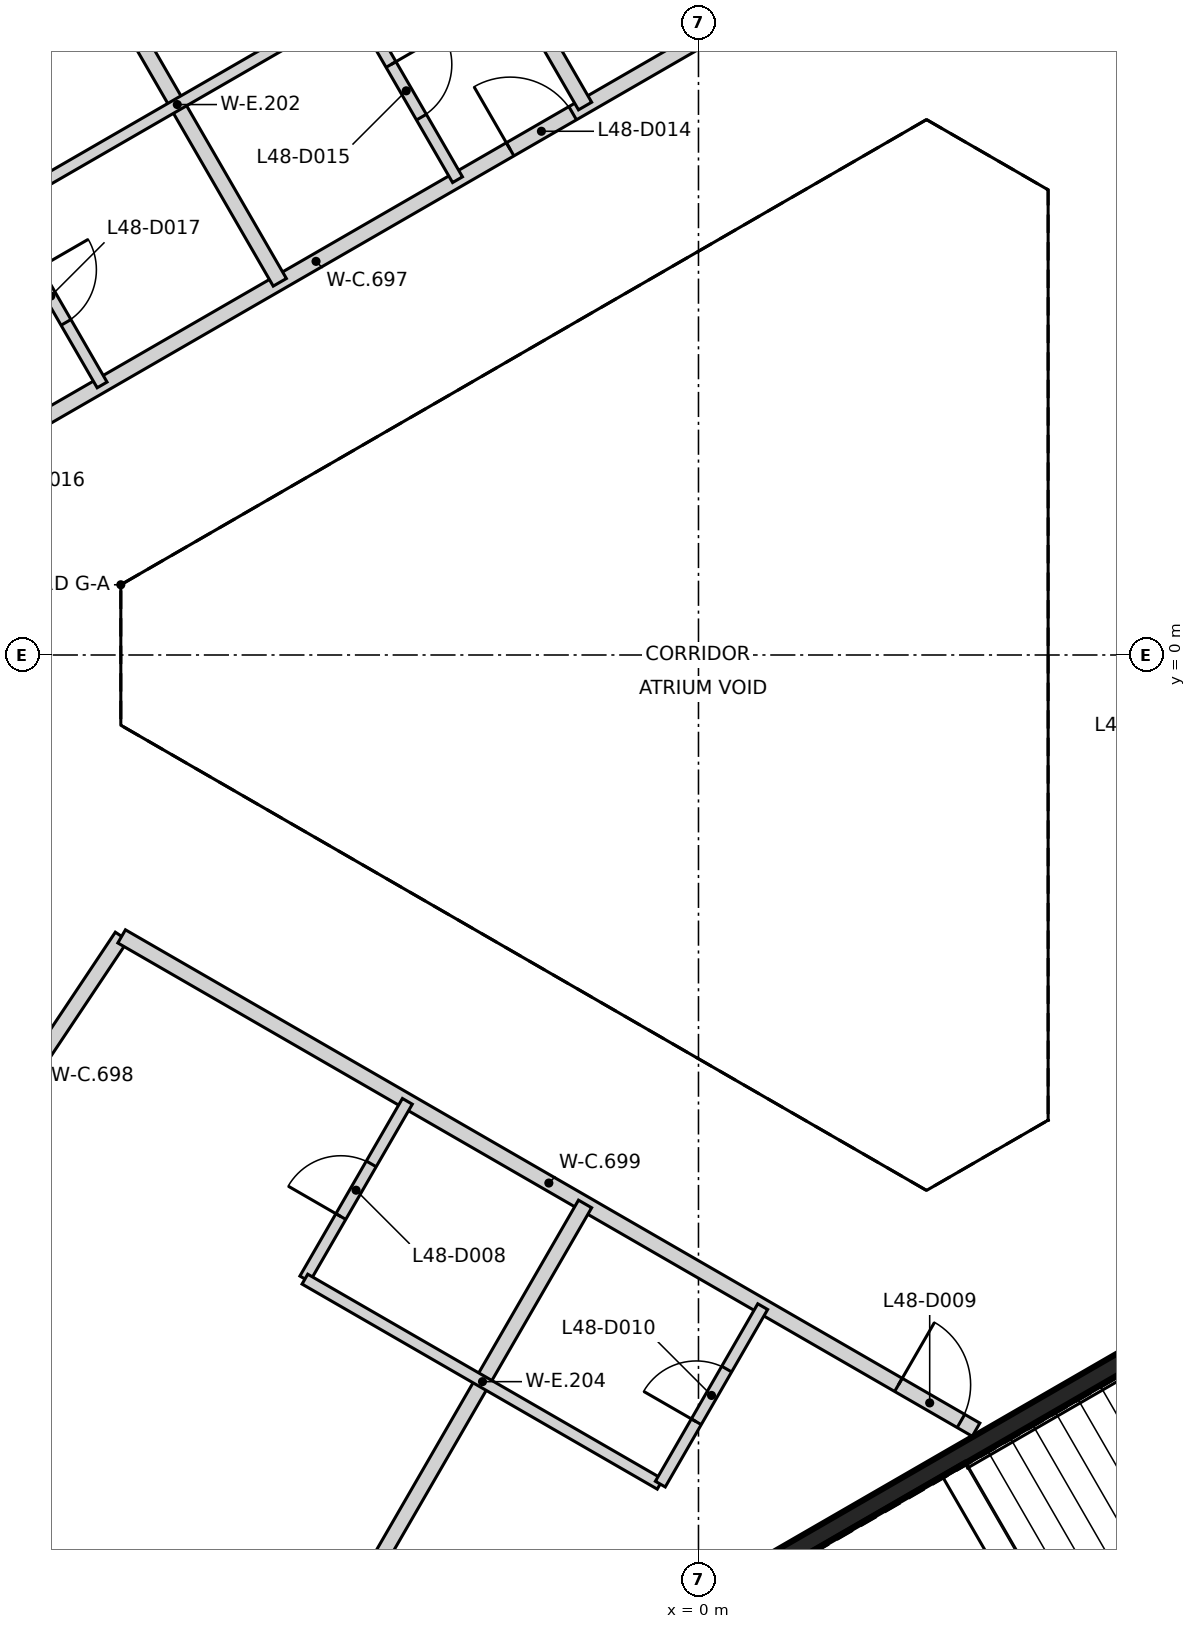
"""IFC4 building model, lengths in metres.
Left out: names, types, materials, properties, quantities, classifications, styles, units other than length and angle.
Written with IfcOpenShell. Run it as: python <this file> out.ifc"""

import sys

from ifc_helpers import new_model, si_unit, direction, frame, frame_2d, origin, place, context, subcontext, project, spatial, rectangle, extrude, element, fill, save


model = new_model("IFC4")
c1 = context("Model", 3, precision=1e-05, world=origin(), true_north=direction((0.0, 1.0)))
c2 = subcontext(c1, "Body", "Model", "MODEL_VIEW")
j1 = project(units=[si_unit("LENGTHUNIT", "METRE"), si_unit("PLANEANGLEUNIT", "RADIAN")], contexts=[c1])
p1 = place(None, origin())
s1 = spatial("IfcSite", under=j1, at=p1, CompositionType="ELEMENT")
p2 = place(p1, origin())
s2 = spatial("IfcBuilding", under=s1, at=p2, CompositionType="ELEMENT")
p3 = place(p2, frame((0.0, 0.0, 193.6)))
s3 = spatial("IfcBuildingStorey", under=s2, at=p3, CompositionType="ELEMENT", Elevation=193.6)
p4 = place(p3, frame((10.42, 6.498, 0.0), z_axis=(0.0, 0.0, 1.0), x_axis=(-0.866021906294, 0.500006057782, 0.0)))
e1 = element("IfcWall", 1, at=p4, inside=s3, PredefinedType="SHEAR", context=c2, shape_type="SweptSolid", body=[
    extrude(rectangle(XDim=11.55, YDim=0.25, at=frame_2d((5.775, 0.0))), origin(), (0.0, 0.0, 1.0), 3.25),
])
p5 = place(p4, frame((10.025, 0.0, 0.0)))
e2 = element("IfcOpeningElement", 2, at=p5, cuts=e1, PredefinedType="OPENING", context=c2, shape_type="SweptSolid", body=[
    extrude(rectangle(XDim=1.2, YDim=2.1, at=frame_2d((0.6, 1.05))), frame((0.0, 0.135, 0.0), z_axis=(0.0, -1.0, 0.0), x_axis=(1.0, 0.0, 0.0)), (0.0, 0.0, 1.0), 0.27),
])
p6 = place(p4, frame((8.725, 0.0, 0.0)))
e3 = element("IfcOpeningElement", 3, at=p6, cuts=e1, PredefinedType="OPENING", context=c2, shape_type="SweptSolid", body=[
    extrude(rectangle(XDim=1.2, YDim=2.1, at=frame_2d((0.6, 1.05))), frame((0.0, 0.135, 0.0), z_axis=(0.0, -1.0, 0.0), x_axis=(1.0, 0.0, 0.0)), (0.0, 0.0, 1.0), 0.27),
])
p7 = place(p3, frame((0.417, -12.273, 0.0), z_axis=(0.0, 0.0, 1.0), x_axis=(0.866021906294, 0.500006057782, 0.0)))
e4 = element("IfcWall", 4, at=p7, inside=s3, PredefinedType="SHEAR", context=c2, shape_type="SweptSolid", body=[
    extrude(rectangle(XDim=11.55, YDim=0.25, at=frame_2d((5.775, 0.0))), origin(), (0.0, 0.0, 1.0), 3.25),
])
p8 = place(p7, frame((10.025, 0.0, 0.0)))
e5 = element("IfcOpeningElement", 5, at=p8, cuts=e4, PredefinedType="OPENING", context=c2, shape_type="SweptSolid", body=[
    extrude(rectangle(XDim=1.2, YDim=2.1, at=frame_2d((0.6, 1.05))), frame((0.0, 0.135, 0.0), z_axis=(0.0, -1.0, 0.0), x_axis=(1.0, 0.0, 0.0)), (0.0, 0.0, 1.0), 0.27),
])
p9 = place(p7, frame((8.725, 0.0, 0.0)))
e6 = element("IfcOpeningElement", 6, at=p9, cuts=e4, PredefinedType="OPENING", context=c2, shape_type="SweptSolid", body=[
    extrude(rectangle(XDim=1.2, YDim=2.1, at=frame_2d((0.6, 1.05))), frame((0.0, 0.135, 0.0), z_axis=(0.0, -1.0, 0.0), x_axis=(1.0, 0.0, 0.0)), (0.0, 0.0, 1.0), 0.27),
])
p10 = place(p3, frame((-10.652, 1.934, 0.0), z_axis=(0.0, 0.0, 1.0), x_axis=(0.866066882415, 0.499928150021, 0.0)))
e7 = element("IfcWall", 7, at=p10, inside=s3, PredefinedType="PARTITIONING", context=c2, shape_type="SweptSolid", body=[
    extrude(rectangle(XDim=12.98, YDim=0.2, at=frame_2d((6.49, 0.0))), origin(), (0.0, 0.0, 1.0), 3.25),
])
p11 = place(p10, frame((9.439, 0.0, 0.0)))
e8 = element("IfcOpeningElement", 8, at=p11, cuts=e7, PredefinedType="OPENING", context=c2, shape_type="SweptSolid", body=[
    extrude(rectangle(XDim=0.95, YDim=2.1, at=frame_2d((0.475, 1.05))), frame((0.0, 0.11, 0.0), z_axis=(0.0, -1.0, 0.0), x_axis=(1.0, 0.0, 0.0)), (0.0, 0.0, 1.0), 0.22),
])
p12 = place(p10, frame((0.229, 0.0, 0.0)))
e9 = element("IfcOpeningElement", 9, at=p12, cuts=e7, PredefinedType="OPENING", context=c2, shape_type="SweptSolid", body=[
    extrude(rectangle(XDim=0.95, YDim=2.1, at=frame_2d((0.475, 1.05))), frame((0.0, 0.11, 0.0), z_axis=(0.0, -1.0, 0.0), x_axis=(1.0, 0.0, 0.0)), (0.0, 0.0, 1.0), 0.22),
])
p13 = place(p3, frame((-9.697, -6.864, 0.0), z_axis=(0.0, 0.0, 1.0), x_axis=(0.554670545446, 0.832070060761, 0.0)))
e10 = element("IfcWall", 10, at=p13, inside=s3, PredefinedType="PARTITIONING", context=c2, shape_type="SweptSolid", body=[
    extrude(rectangle(XDim=3.8, YDim=0.2, at=frame_2d((1.9, 0.0))), origin(), (0.0, 0.0, 1.0), 3.25),
])
p14 = place(p3, frame((-7.589, -3.702, 0.0), z_axis=(0.0, 0.0, 1.0), x_axis=(0.86602490244, -0.500000868353, 0.0)))
e11 = element("IfcWall", 11, at=p14, inside=s3, PredefinedType="PARTITIONING", context=c2, shape_type="SweptSolid", body=[
    extrude(rectangle(XDim=12.98, YDim=0.2, at=frame_2d((6.49, 0.0))), origin(), (0.0, 0.0, 1.0), 3.25),
])
p15 = place(p14, frame((11.8, 0.0, 0.0)))
e12 = element("IfcOpeningElement", 12, at=p15, cuts=e11, PredefinedType="OPENING", context=c2, shape_type="SweptSolid", body=[
    extrude(rectangle(XDim=0.95, YDim=2.1, at=frame_2d((0.475, 1.05))), frame((0.0, 0.11, 0.0), z_axis=(0.0, -1.0, 0.0), x_axis=(1.0, 0.0, 0.0)), (0.0, 0.0, 1.0), 0.22),
])
p16 = place(p3, frame((-12.067, 16.263, 0.0), z_axis=(0.0, 0.0, 1.0), x_axis=(0.500016190239, -0.866016056144, 0.0)))
e13 = element("IfcWall", 13, at=p16, inside=s3, PredefinedType="PARTITIONING", context=c2, shape_type="SweptSolid", body=[
    extrude(rectangle(XDim=13.118, YDim=0.2, at=frame_2d((6.559, 0.0))), origin(), (0.0, 0.0, 1.0), 3.25),
])
for number, where, z_axis, x_axis in (
    (14, (-8.052, 18.582, 0.0), (0.0, 0.0, 1.0), (0.5, -0.866, 0.0)),
    (15, (-8.051, -18.582, 0.0), (0.0, 0.0, 1.0), (0.5, 0.866, 0.0)),
):
    element("IfcWall", number, at=place(p3, frame(where, z_axis=z_axis, x_axis=x_axis)), inside=s3, PredefinedType="PARTITIONING", context=c2, shape_type="SweptSolid", body=[
        extrude(rectangle(XDim=13.118, YDim=0.2, at=frame_2d((6.559, 0.0))), origin(), (0.0, 0.0, 1.0), 3.25),
    ])
p17 = place(p3, frame((-9.195, 5.889, 0.0), z_axis=(0.0, 0.0, 1.0), x_axis=(0.500129820725, -0.865950438779, 0.0)))
e16 = element("IfcWall", 16, at=p17, inside=s3, PredefinedType="PARTITIONING", context=c2, shape_type="SweptSolid", body=[
    extrude(rectangle(XDim=2.698, YDim=0.15, at=frame_2d((1.349, 0.0))), origin(), (0.0, 0.0, 1.0), 3.25),
])
p18 = place(p17, frame((0.948, 0.0, 0.0)))
e17 = element("IfcOpeningElement", 17, at=p18, cuts=e16, PredefinedType="OPENING", context=c2, shape_type="SweptSolid", body=[
    extrude(rectangle(XDim=0.8, YDim=2.1, at=frame_2d((0.4, 1.05))), frame((0.0, 0.085, 0.0), z_axis=(0.0, -1.0, 0.0), x_axis=(1.0, 0.0, 0.0)), (0.0, 0.0, 1.0), 0.17),
])
p19 = place(p3, frame((-9.194, 5.892, 0.0), z_axis=(0.0, 0.0, 1.0), x_axis=(0.8659934935, 0.500055266161, 0.0)))
e18 = element("IfcWall", 18, at=p19, inside=s3, PredefinedType="PARTITIONING", context=c2, shape_type="SweptSolid", body=[
    extrude(rectangle(XDim=5.397, YDim=0.15, at=frame_2d((2.699, 0.0))), origin(), (0.0, 0.0, 1.0), 3.25),
])
p20 = place(p3, frame((-5.179, -8.208, 0.0), z_axis=(0.0, 0.0, 1.0), x_axis=(0.500061949227, 0.865989634427, 0.0)))
e19 = element("IfcWall", 19, at=p20, inside=s3, PredefinedType="PARTITIONING", context=c2, shape_type="SweptSolid", body=[
    extrude(rectangle(XDim=2.698, YDim=0.15, at=frame_2d((1.349, 0.0))), origin(), (0.0, 0.0, 1.0), 3.25),
])
p21 = place(p20, frame((0.948, 0.0, 0.0)))
e20 = element("IfcOpeningElement", 20, at=p21, cuts=e19, PredefinedType="OPENING", context=c2, shape_type="SweptSolid", body=[
    extrude(rectangle(XDim=0.8, YDim=2.1, at=frame_2d((0.4, 1.05))), frame((0.0, 0.085, 0.0), z_axis=(0.0, -1.0, 0.0), x_axis=(1.0, 0.0, 0.0)), (0.0, 0.0, 1.0), 0.17),
])
p22 = place(p3, frame((-5.178, -8.211, 0.0), z_axis=(0.0, 0.0, 1.0), x_axis=(0.866046199912, -0.49996397832, 0.0)))
e21 = element("IfcWall", 21, at=p22, inside=s3, PredefinedType="PARTITIONING", context=c2, shape_type="SweptSolid", body=[
    extrude(rectangle(XDim=5.396, YDim=0.15, at=frame_2d((2.698, 0.0))), origin(), (0.0, 0.0, 1.0), 3.25),
])
p23 = place(p3, frame((-4.52, 8.591, 0.0), z_axis=(0.0, 0.0, 1.0), x_axis=(0.500048589285, -0.86599734893, 0.0)))
e22 = element("IfcWall", 22, at=p23, inside=s3, PredefinedType="PARTITIONING", context=c2, shape_type="SweptSolid", body=[
    extrude(rectangle(XDim=2.7, YDim=0.15, at=frame_2d((1.35, 0.0))), origin(), (0.0, 0.0, 1.0), 3.25),
])
p24 = place(p23, frame((0.95, 0.0, 0.0)))
e23 = element("IfcOpeningElement", 23, at=p24, cuts=e22, PredefinedType="OPENING", context=c2, shape_type="SweptSolid", body=[
    extrude(rectangle(XDim=0.8, YDim=2.1, at=frame_2d((0.4, 1.05))), frame((0.0, 0.085, 0.0), z_axis=(0.0, -1.0, 0.0), x_axis=(1.0, 0.0, 0.0)), (0.0, 0.0, 1.0), 0.17),
])
p25 = place(p3, frame((-0.502, -10.908, 0.0), z_axis=(0.0, 0.0, 1.0), x_axis=(0.499675408556, 0.866212725654, 0.0)))
e24 = element("IfcWall", 24, at=p25, inside=s3, PredefinedType="PARTITIONING", context=c2, shape_type="SweptSolid", body=[
    extrude(rectangle(XDim=2.696, YDim=0.15, at=frame_2d((1.348, 0.0))), origin(), (0.0, 0.0, 1.0), 3.25),
])
p26 = place(p25, frame((0.948, 0.0, 0.0)))
e25 = element("IfcOpeningElement", 25, at=p26, cuts=e24, PredefinedType="OPENING", context=c2, shape_type="SweptSolid", body=[
    extrude(rectangle(XDim=0.8, YDim=2.1, at=frame_2d((0.4, 1.05))), frame((0.0, 0.085, 0.0), z_axis=(0.0, -1.0, 0.0), x_axis=(1.0, 0.0, 0.0)), (0.0, 0.0, 1.0), 0.17),
])
p27 = place(p21, origin())
e26 = element("IfcDoor", 26, at=p27, inside=s3, OperationType="SINGLE_SWING_LEFT", PredefinedType="DOOR", context=c2, shape_type="SweptSolid", body=[
    extrude(rectangle(XDim=0.8, YDim=2.1, at=frame_2d((0.4, 1.05))), frame((0.0, 0.025, 0.0), z_axis=(0.0, -1.0, 0.0), x_axis=(1.0, 0.0, 0.0)), (0.0, 0.0, 1.0), 0.05),
])
fill(e20, e26)
p28 = place(p15, frame((0.95, 0.0, 0.0), z_axis=(0.0, 0.0, 1.0), x_axis=(-1.0, 0.0, 0.0)))
e27 = element("IfcDoor", 27, at=p28, inside=s3, OperationType="SINGLE_SWING_LEFT", PredefinedType="DOOR", context=c2, shape_type="SweptSolid", body=[
    extrude(rectangle(XDim=0.95, YDim=2.1, at=frame_2d((0.475, 1.05))), frame((0.0, 0.025, 0.0), z_axis=(0.0, -1.0, 0.0), x_axis=(1.0, 0.0, 0.0)), (0.0, 0.0, 1.0), 0.05),
])
fill(e12, e27)
p29 = place(p26, frame((0.8, 0.0, 0.0), z_axis=(0.0, 0.0, 1.0), x_axis=(-1.0, 0.0, 0.0)))
e28 = element("IfcDoor", 28, at=p29, inside=s3, OperationType="SINGLE_SWING_LEFT", PredefinedType="DOOR", context=c2, shape_type="SweptSolid", body=[
    extrude(rectangle(XDim=0.8, YDim=2.1, at=frame_2d((0.4, 1.05))), frame((0.0, 0.025, 0.0), z_axis=(0.0, -1.0, 0.0), x_axis=(1.0, 0.0, 0.0)), (0.0, 0.0, 1.0), 0.05),
])
fill(e25, e28)
p30 = place(p11, origin())
e29 = element("IfcDoor", 29, at=p30, inside=s3, OperationType="SINGLE_SWING_LEFT", PredefinedType="DOOR", context=c2, shape_type="SweptSolid", body=[
    extrude(rectangle(XDim=0.95, YDim=2.1, at=frame_2d((0.475, 1.05))), frame((0.0, 0.025, 0.0), z_axis=(0.0, -1.0, 0.0), x_axis=(1.0, 0.0, 0.0)), (0.0, 0.0, 1.0), 0.05),
])
fill(e8, e29)
p31 = place(p24, frame((0.8, 0.0, 0.0), z_axis=(0.0, 0.0, 1.0), x_axis=(-1.0, 0.0, 0.0)))
e30 = element("IfcDoor", 30, at=p31, inside=s3, OperationType="SINGLE_SWING_LEFT", PredefinedType="DOOR", context=c2, shape_type="SweptSolid", body=[
    extrude(rectangle(XDim=0.8, YDim=2.1, at=frame_2d((0.4, 1.05))), frame((0.0, 0.025, 0.0), z_axis=(0.0, -1.0, 0.0), x_axis=(1.0, 0.0, 0.0)), (0.0, 0.0, 1.0), 0.05),
])
fill(e23, e30)
p32 = place(p18, frame((0.8, 0.0, 0.0), z_axis=(0.0, 0.0, 1.0), x_axis=(-1.0, 0.0, 0.0)))
e31 = element("IfcDoor", 31, at=p32, inside=s3, OperationType="SINGLE_SWING_LEFT", PredefinedType="DOOR", context=c2, shape_type="SweptSolid", body=[
    extrude(rectangle(XDim=0.8, YDim=2.1, at=frame_2d((0.4, 1.05))), frame((0.0, 0.025, 0.0), z_axis=(0.0, -1.0, 0.0), x_axis=(1.0, 0.0, 0.0)), (0.0, 0.0, 1.0), 0.05),
])
fill(e17, e31)
save(model, sys.argv[1])
